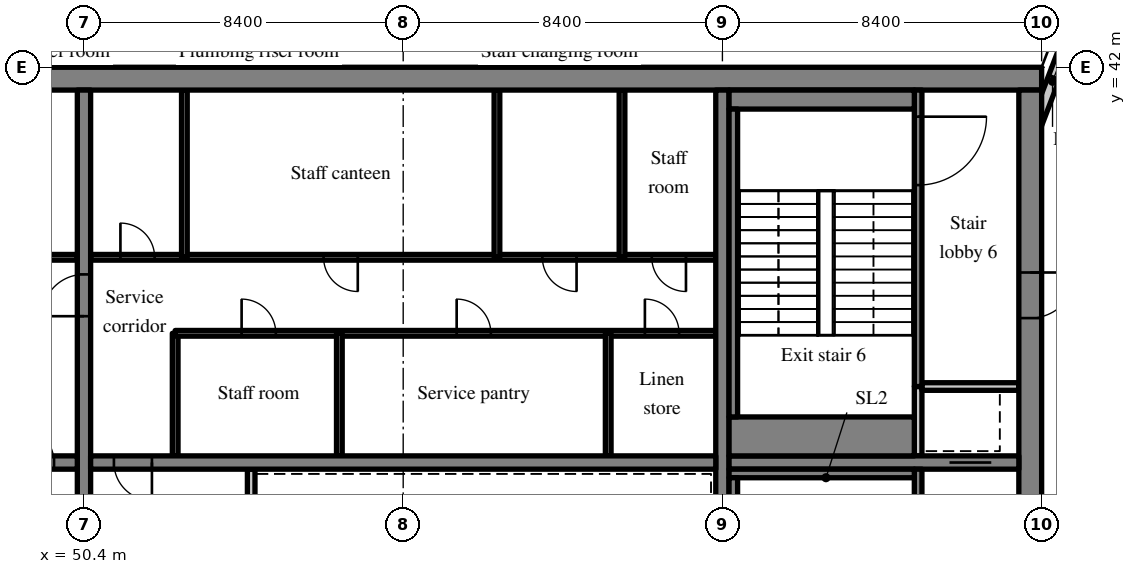
"""IFC4 building model, lengths in metres.
Left out: names, types, materials, properties, quantities, classifications, styles, units other than length and angle.
Written with IfcOpenShell. Run it as: python <this file> out.ifc"""

import sys

from ifc_helpers import new_model, si_unit, direction, frame, frame_2d, origin, place, context, subcontext, project, spatial, rectangle, extrude, source, transform, mapped, element, fill, save


model = new_model("IFC4")
c1 = context("Model", 3, precision=1e-05, world=origin(), true_north=direction((0.0, 1.0)))
c2 = subcontext(c1, "Body", "Model", "MODEL_VIEW")
j1 = project(units=[si_unit("LENGTHUNIT", "METRE"), si_unit("PLANEANGLEUNIT", "RADIAN")], contexts=[c1])
p1 = place(None, origin())
s1 = spatial("IfcSite", under=j1, at=p1, CompositionType="ELEMENT")
p2 = place(p1, origin())
s2 = spatial("IfcBuilding", under=s1, at=p2, CompositionType="ELEMENT")
p3 = place(p2, frame((0.0, 0.0, 217.9)))
s3 = spatial("IfcBuildingStorey", under=s2, at=p3, CompositionType="ELEMENT", Elevation=217.9)
m1 = source(origin(), c2, "Body", "SweptSolid", [
    extrude(rectangle(XDim=50.4, YDim=0.6, at=frame_2d((25.2, 0.0))), origin(), (0.0, 0.0, 1.0), 3.62),
])
p4 = place(p3, frame((25.2, 41.7, 0.0), z_axis=(0.0, 0.0, 1.0), x_axis=(1.0, 0.0, 0.0)))
e1 = element("IfcWall", 1, at=p4, inside=s3, PredefinedType="SHEAR", context=c2, shape_type="MappedRepresentation", body=[
    mapped(m1, transform((0.0, 0.0, 0.0), scale=1.0)),
])
m2 = source(origin(), c2, "Body", "SweptSolid", [
    extrude(rectangle(XDim=18.8, YDim=0.6, at=frame_2d((9.4, 0.0))), origin(), (0.0, 0.0, 1.0), 3.62),
])
p5 = place(p3, frame((75.3, 22.6, 0.0), z_axis=(0.0, 0.0, 1.0), x_axis=(0.0, 1.0, 0.0)))
e2 = element("IfcWall", 2, at=p5, inside=s3, PredefinedType="SHEAR", context=c2, shape_type="MappedRepresentation", body=[
    mapped(m2, transform((0.0, 0.0, 0.0), scale=1.0)),
])
m3 = source(origin(), c2, "Body", "SweptSolid", [
    extrude(rectangle(XDim=1.2, YDim=2.1, at=frame_2d((0.6, 1.05))), frame((0.0, 0.31, 0.0), z_axis=(0.0, -1.0, 0.0), x_axis=(1.0, 0.0, 0.0)), (0.0, 0.0, 1.0), 0.62),
])
p6 = place(p5, frame((12.8, 0.0, 0.0)))
e3 = element("IfcOpeningElement", 3, at=p6, cuts=e2, PredefinedType="OPENING", context=c2, shape_type="MappedRepresentation", body=[
    mapped(m3, transform((0.0, 0.0, 0.0), scale=1.0)),
])
m4 = source(origin(), c2, "Body", "SweptSolid", [
    extrude(rectangle(XDim=18.8, YDim=0.35, at=frame_2d((9.4, 0.0))), origin(), (0.0, 0.0, 1.0), 3.62),
])
p7 = place(p3, frame((50.4, 22.6, 0.0), z_axis=(0.0, 0.0, 1.0), x_axis=(0.0, 1.0, 0.0)))
e4 = element("IfcWall", 4, at=p7, inside=s3, PredefinedType="SHEAR", context=c2, shape_type="MappedRepresentation", body=[
    mapped(m4, transform((0.0, 0.0, 0.0), scale=1.0)),
])
m5 = source(origin(), c2, "Body", "SweptSolid", [
    extrude(rectangle(XDim=1.1, YDim=2.1, at=frame_2d((0.55, 1.05))), frame((0.0, 0.185, 0.0), z_axis=(0.0, -1.0, 0.0), x_axis=(1.0, 0.0, 0.0)), (0.0, 0.0, 1.0), 0.37),
])
p8 = place(p7, frame((12.85, 0.0, 0.0)))
e5 = element("IfcOpeningElement", 5, at=p8, cuts=e4, PredefinedType="OPENING", context=c2, shape_type="MappedRepresentation", body=[
    mapped(m5, transform((0.0, 0.0, 0.0), scale=1.0)),
])
p9 = place(p3, frame((67.2, 22.6, 0.0), z_axis=(0.0, 0.0, 1.0), x_axis=(0.0, 1.0, 0.0)))
e6 = element("IfcWall", 6, at=p9, inside=s3, PredefinedType="SHEAR", context=c2, shape_type="MappedRepresentation", body=[
    mapped(m4, transform((0.0, 0.0, 0.0), scale=1.0)),
])
m6 = source(origin(), c2, "Body", "SweptSolid", [
    extrude(rectangle(XDim=16.45, YDim=0.35, at=frame_2d((8.225, 0.0))), origin(), (0.0, 0.0, 1.0), 3.62),
])
p10 = place(p3, frame((33.775, 31.6, 0.0), z_axis=(0.0, 0.0, 1.0), x_axis=(1.0, 0.0, 0.0)))
e7 = element("IfcWall", 7, at=p10, inside=s3, PredefinedType="SHEAR", context=c2, shape_type="MappedRepresentation", body=[
    mapped(m6, transform((0.0, 0.0, 0.0), scale=1.0)),
])
m7 = source(origin(), c2, "Body", "SweptSolid", [
    extrude(rectangle(XDim=1.0, YDim=2.1, at=frame_2d((0.5, 1.05))), frame((0.0, 0.185, 0.0), z_axis=(0.0, -1.0, 0.0), x_axis=(1.0, 0.0, 0.0)), (0.0, 0.0, 1.0), 0.37),
])
p11 = place(p10, frame((14.837, 0.0, 0.0)))
e8 = element("IfcOpeningElement", 8, at=p11, cuts=e7, PredefinedType="OPENING", context=c2, shape_type="MappedRepresentation", body=[
    mapped(m7, transform((0.0, 0.0, 0.0), scale=1.0)),
])
m8 = source(origin(), c2, "Body", "SweptSolid", [
    extrude(rectangle(XDim=16.45, YDim=0.35, at=frame_2d((8.225, 0.0))), origin(), (0.0, 0.0, 1.0), 3.62),
])
p12 = place(p3, frame((50.575, 31.6, 0.0), z_axis=(0.0, 0.0, 1.0), x_axis=(1.0, 0.0, 0.0)))
e9 = element("IfcWall", 9, at=p12, inside=s3, PredefinedType="SHEAR", context=c2, shape_type="MappedRepresentation", body=[
    mapped(m8, transform((0.0, 0.0, 0.0), scale=1.0)),
])
p13 = place(p12, frame((0.613, 0.0, 0.0)))
e10 = element("IfcOpeningElement", 10, at=p13, cuts=e9, PredefinedType="OPENING", context=c2, shape_type="MappedRepresentation", body=[
    mapped(m7, transform((0.0, 0.0, 0.0), scale=1.0)),
])
m9 = source(origin(), c2, "Body", "SweptSolid", [
    extrude(rectangle(XDim=7.625, YDim=0.35, at=frame_2d((3.812, 0.0))), origin(), (0.0, 0.0, 1.0), 3.62),
])
p14 = place(p3, frame((67.375, 31.6, 0.0), z_axis=(0.0, 0.0, 1.0), x_axis=(1.0, 0.0, 0.0)))
e11 = element("IfcWall", 11, at=p14, inside=s3, PredefinedType="SHEAR", context=c2, shape_type="MappedRepresentation", body=[
    mapped(m9, transform((0.0, 0.0, 0.0), scale=1.0)),
])
p15 = place(p14, frame((5.8, 0.0, 0.0)))
e12 = element("IfcOpeningElement", 12, at=p15, cuts=e11, PredefinedType="OPENING", context=c2, shape_type="MappedRepresentation", body=[
    mapped(m5, transform((0.0, 0.0, 0.0), scale=1.0)),
])
m10 = source(origin(), c2, "Body", "SweptSolid", [
    extrude(rectangle(XDim=3.559, YDim=0.3, at=frame_2d((1.78, 0.0))), origin(), (0.0, 0.0, 1.0), 3.62),
])
p16 = place(p3, frame((76.523, 43.292, 0.0), z_axis=(0.0, 0.0, 1.0), x_axis=(-0.35779745313, -0.933799219604, 0.0)))
e13 = element("IfcWall", 13, at=p16, inside=s3, PredefinedType="SOLIDWALL", context=c2, shape_type="MappedRepresentation", body=[
    mapped(m10, transform((0.0, 0.0, 0.0), scale=1.0)),
])
m11 = source(origin(), c2, "Body", "SweptSolid", [
    extrude(rectangle(XDim=1.5, YDim=2.0, at=frame_2d((0.75, 1.0))), frame((0.0, 0.16, 0.0), z_axis=(0.0, -1.0, 0.0), x_axis=(1.0, 0.0, 0.0)), (0.0, 0.0, 1.0), 0.32),
])
p17 = place(p16, frame((0.156, 0.0, 0.9)))
e14 = element("IfcOpeningElement", 14, at=p17, cuts=e13, PredefinedType="OPENING", context=c2, shape_type="MappedRepresentation", body=[
    mapped(m11, transform((0.0, 0.0, 0.0), scale=1.0)),
])
m12 = source(origin(), c2, "Body", "SweptSolid", [
    extrude(rectangle(XDim=16.45, YDim=0.15, at=frame_2d((8.225, 0.0))), origin(), (0.0, 0.0, 1.0), 3.62),
])
p18 = place(p3, frame((33.775, 37.0, 0.0), z_axis=(0.0, 0.0, 1.0), x_axis=(1.0, 0.0, 0.0)))
e15 = element("IfcWall", 15, at=p18, inside=s3, PredefinedType="PARTITIONING", context=c2, shape_type="MappedRepresentation", body=[
    mapped(m12, transform((0.0, 0.0, 0.0), scale=1.0)),
])
m13 = source(origin(), c2, "Body", "SweptSolid", [
    extrude(rectangle(XDim=0.9, YDim=2.1, at=frame_2d((0.45, 1.05))), frame((0.0, 0.085, 0.0), z_axis=(0.0, -1.0, 0.0), x_axis=(1.0, 0.0, 0.0)), (0.0, 0.0, 1.0), 0.17),
])
p19 = place(p18, frame((3.251, 0.0, 0.0)))
e16 = element("IfcOpeningElement", 16, at=p19, cuts=e15, PredefinedType="OPENING", context=c2, shape_type="MappedRepresentation", body=[
    mapped(m13, transform((0.0, 0.0, 0.0), scale=1.0)),
])
p20 = place(p18, frame((8.186, 0.0, 0.0)))
e17 = element("IfcOpeningElement", 17, at=p20, cuts=e15, PredefinedType="OPENING", context=c2, shape_type="MappedRepresentation", body=[
    mapped(m13, transform((0.0, 0.0, 0.0), scale=1.0)),
])
p21 = place(p18, frame((11.476, 0.0, 0.0)))
e18 = element("IfcOpeningElement", 18, at=p21, cuts=e15, PredefinedType="OPENING", context=c2, shape_type="MappedRepresentation", body=[
    mapped(m13, transform((0.0, 0.0, 0.0), scale=1.0)),
])
p22 = place(p18, frame((14.766, 0.0, 0.0)))
e19 = element("IfcOpeningElement", 19, at=p22, cuts=e15, PredefinedType="OPENING", context=c2, shape_type="MappedRepresentation", body=[
    mapped(m13, transform((0.0, 0.0, 0.0), scale=1.0)),
])
m14 = source(origin(), c2, "Body", "SweptSolid", [
    extrude(rectangle(XDim=2.625, YDim=0.2, at=frame_2d((1.312, 0.0))), origin(), (0.0, 0.0, 1.0), 3.62),
])
p23 = place(p3, frame((54.8, 28.8, 0.0), z_axis=(0.0, 0.0, 1.0), x_axis=(0.0, 1.0, 0.0)))
e20 = element("IfcWall", 20, at=p23, inside=s3, PredefinedType="SOLIDWALL", context=c2, shape_type="MappedRepresentation", body=[
    mapped(m14, transform((0.0, 0.0, 0.0), scale=1.0)),
])
m15 = source(origin(), c2, "Body", "SweptSolid", [
    extrude(rectangle(XDim=3.225, YDim=0.15, at=frame_2d((1.613, 0.0))), origin(), (0.0, 0.0, 1.0), 3.62),
])
p24 = place(p3, frame((52.8, 31.775, 0.0), z_axis=(0.0, 0.0, 1.0), x_axis=(0.0, 1.0, 0.0)))
e21 = element("IfcWall", 21, at=p24, inside=s3, PredefinedType="PARTITIONING", context=c2, shape_type="MappedRepresentation", body=[
    mapped(m15, transform((0.0, 0.0, 0.0), scale=1.0)),
])
m16 = source(origin(), c2, "Body", "SweptSolid", [
    extrude(rectangle(XDim=14.225, YDim=0.15, at=frame_2d((7.112, 0.0))), origin(), (0.0, 0.0, 1.0), 3.62),
])
p25 = place(p3, frame((67.025, 35.0, 0.0), z_axis=(0.0, 0.0, 1.0), x_axis=(-1.0, 0.0, 0.0)))
e22 = element("IfcWall", 22, at=p25, inside=s3, PredefinedType="PARTITIONING", context=c2, shape_type="MappedRepresentation", body=[
    mapped(m16, transform((0.0, 0.0, 0.0), scale=1.0)),
])
p26 = place(p25, frame((0.965, 0.0, 0.0)))
e23 = element("IfcOpeningElement", 23, at=p26, cuts=e22, PredefinedType="OPENING", context=c2, shape_type="MappedRepresentation", body=[
    mapped(m13, transform((0.0, 0.0, 0.0), scale=1.0)),
])
p27 = place(p25, frame((5.918, 0.0, 0.0)))
e24 = element("IfcOpeningElement", 24, at=p27, cuts=e22, PredefinedType="OPENING", context=c2, shape_type="MappedRepresentation", body=[
    mapped(m13, transform((0.0, 0.0, 0.0), scale=1.0)),
])
p28 = place(p25, frame((11.577, 0.0, 0.0)))
e25 = element("IfcOpeningElement", 25, at=p28, cuts=e22, PredefinedType="OPENING", context=c2, shape_type="MappedRepresentation", body=[
    mapped(m13, transform((0.0, 0.0, 0.0), scale=1.0)),
])
m17 = source(origin(), c2, "Body", "SweptSolid", [
    extrude(rectangle(XDim=16.45, YDim=0.15, at=frame_2d((8.225, 0.0))), origin(), (0.0, 0.0, 1.0), 3.62),
])
p29 = place(p3, frame((67.025, 37.0, 0.0), z_axis=(0.0, 0.0, 1.0), x_axis=(-1.0, 0.0, 0.0)))
e26 = element("IfcWall", 26, at=p29, inside=s3, PredefinedType="PARTITIONING", context=c2, shape_type="MappedRepresentation", body=[
    mapped(m17, transform((0.0, 0.0, 0.0), scale=1.0)),
])
p30 = place(p29, frame((0.784, 0.0, 0.0)))
e27 = element("IfcOpeningElement", 27, at=p30, cuts=e26, PredefinedType="OPENING", context=c2, shape_type="MappedRepresentation", body=[
    mapped(m13, transform((0.0, 0.0, 0.0), scale=1.0)),
])
p31 = place(p29, frame((3.663, 0.0, 0.0)))
e28 = element("IfcOpeningElement", 28, at=p31, cuts=e26, PredefinedType="OPENING", context=c2, shape_type="MappedRepresentation", body=[
    mapped(m13, transform((0.0, 0.0, 0.0), scale=1.0)),
])
p32 = place(p29, frame((9.42, 0.0, 0.0)))
e29 = element("IfcOpeningElement", 29, at=p32, cuts=e26, PredefinedType="OPENING", context=c2, shape_type="MappedRepresentation", body=[
    mapped(m13, transform((0.0, 0.0, 0.0), scale=1.0)),
])
p33 = place(p29, frame((14.766, 0.0, 0.0)))
e30 = element("IfcOpeningElement", 30, at=p33, cuts=e26, PredefinedType="OPENING", context=c2, shape_type="MappedRepresentation", body=[
    mapped(m13, transform((0.0, 0.0, 0.0), scale=1.0)),
])
for number, where, z_axis, x_axis in (
    (31, (64.195, 31.775, 0.0), (0.0, 0.0, 1.0), (0.0, 1.0, 0.0)),
    (32, (57.12, 31.775, 0.0), (0.0, 0.0, 1.0), (0.0, 1.0, 0.0)),
):
    element("IfcWall", number, at=place(p3, frame(where, z_axis=z_axis, x_axis=x_axis)), inside=s3, PredefinedType="PARTITIONING", context=c2, shape_type="MappedRepresentation", body=[
        mapped(m15, transform((0.0, 0.0, 0.0), scale=1.0)),
    ])
m18 = source(origin(), c2, "Body", "SweptSolid", [
    extrude(rectangle(XDim=4.4, YDim=0.15, at=frame_2d((2.2, 0.0))), origin(), (0.0, 0.0, 1.0), 3.62),
])
for number, where, z_axis, x_axis in (
    (33, (64.558, 37.0, 0.0), (0.0, 0.0, 1.0), (0.0, 1.0, 0.0)),
    (34, (61.267, 37.0, 0.0), (0.0, 0.0, 1.0), (0.0, 1.0, 0.0)),
    (35, (53.042, 37.0, 0.0), (0.0, 0.0, 1.0), (0.0, 1.0, 0.0)),
):
    element("IfcWall", number, at=place(p3, frame(where, z_axis=z_axis, x_axis=x_axis)), inside=s3, PredefinedType="PARTITIONING", context=c2, shape_type="MappedRepresentation", body=[
        mapped(m18, transform((0.0, 0.0, 0.0), scale=1.0)),
    ])
m19 = source(origin(), c2, "Body", "SweptSolid", [
    extrude(rectangle(XDim=8.825, YDim=0.2, at=frame_2d((4.413, 0.0))), origin(), (0.0, 0.0, 1.0), 3.62),
])
p34 = place(p3, frame((72.35, 22.6, 0.0), z_axis=(0.0, 0.0, 1.0), x_axis=(0.0, 1.0, 0.0)))
e36 = element("IfcWall", 36, at=p34, inside=s3, PredefinedType="SOLIDWALL", context=c2, shape_type="MappedRepresentation", body=[
    mapped(m19, transform((0.0, 0.0, 0.0), scale=1.0)),
])
m20 = source(origin(), c2, "Body", "SweptSolid", [
    extrude(rectangle(XDim=1.2, YDim=2.1, at=frame_2d((0.6, 1.05))), frame((0.0, 0.11, 0.0), z_axis=(0.0, -1.0, 0.0), x_axis=(1.0, 0.0, 0.0)), (0.0, 0.0, 1.0), 0.22),
])
p35 = place(p34, frame((6.9, 0.0, 0.0)))
e37 = element("IfcOpeningElement", 37, at=p35, cuts=e36, PredefinedType="OPENING", context=c2, shape_type="MappedRepresentation", body=[
    mapped(m20, transform((0.0, 0.0, 0.0), scale=1.0)),
])
m21 = source(origin(), c2, "Body", "SweptSolid", [
    extrude(rectangle(XDim=1.825, YDim=0.2, at=frame_2d((0.913, 0.0))), origin(), (0.0, 0.0, 1.0), 3.62),
])
p36 = place(p3, frame((72.35, 31.775, 0.0), z_axis=(0.0, 0.0, 1.0), x_axis=(0.0, 1.0, 0.0)))
e38 = element("IfcWall", 38, at=p36, inside=s3, PredefinedType="SOLIDWALL", context=c2, shape_type="MappedRepresentation", body=[
    mapped(m21, transform((0.0, 0.0, 0.0), scale=1.0)),
])
m22 = source(origin(), c2, "Body", "SweptSolid", [
    extrude(rectangle(XDim=2.55, YDim=0.2, at=frame_2d((1.275, 0.0))), origin(), (0.0, 0.0, 1.0), 3.62),
])
p37 = place(p3, frame((72.45, 33.6, 0.0), z_axis=(0.0, 0.0, 1.0), x_axis=(1.0, 0.0, 0.0)))
e39 = element("IfcWall", 39, at=p37, inside=s3, PredefinedType="SOLIDWALL", context=c2, shape_type="MappedRepresentation", body=[
    mapped(m22, transform((0.0, 0.0, 0.0), scale=1.0)),
])
m23 = source(origin(), c2, "Body", "SweptSolid", [
    extrude(rectangle(XDim=7.8, YDim=0.2, at=frame_2d((3.9, 0.0))), origin(), (0.0, 0.0, 1.0), 3.62),
])
p38 = place(p3, frame((72.35, 33.6, 0.0), z_axis=(0.0, 0.0, 1.0), x_axis=(0.0, 1.0, 0.0)))
e40 = element("IfcWall", 40, at=p38, inside=s3, PredefinedType="SOLIDWALL", context=c2, shape_type="MappedRepresentation", body=[
    mapped(m23, transform((0.0, 0.0, 0.0), scale=1.0)),
])
m24 = source(origin(), c2, "Body", "SweptSolid", [
    extrude(rectangle(XDim=1.8, YDim=2.1, at=frame_2d((0.9, 1.05))), frame((0.0, 0.11, 0.0), z_axis=(0.0, -1.0, 0.0), x_axis=(1.0, 0.0, 0.0)), (0.0, 0.0, 1.0), 0.22),
])
p39 = place(p38, frame((5.3, 0.0, 0.0)))
e41 = element("IfcOpeningElement", 41, at=p39, cuts=e40, PredefinedType="OPENING", context=c2, shape_type="MappedRepresentation", body=[
    mapped(m24, transform((0.0, 0.0, 0.0), scale=1.0)),
])
m25 = source(origin(), c2, "Body", "SweptSolid", [
    extrude(rectangle(XDim=4.875, YDim=0.225, at=frame_2d((2.438, 0.0))), origin(), (0.0, 0.0, 1.0), 3.62),
])
p40 = place(p3, frame((67.375, 31.312, 0.0), z_axis=(0.0, 0.0, 1.0), x_axis=(1.0, 0.0, 0.0)))
e42 = element("IfcWall", 42, at=p40, inside=s3, PredefinedType="SOLIDWALL", context=c2, shape_type="MappedRepresentation", body=[
    mapped(m25, transform((0.0, 0.0, 0.0), scale=1.0)),
])
m26 = source(origin(), c2, "Body", "SweptSolid", [
    extrude(rectangle(XDim=8.1, YDim=0.225, at=frame_2d((4.05, 0.0))), origin(), (0.0, 0.0, 1.0), 3.62),
])
p41 = place(p3, frame((67.487, 23.1, 0.0), z_axis=(0.0, 0.0, 1.0), x_axis=(0.0, 1.0, 0.0)))
e43 = element("IfcWall", 43, at=p41, inside=s3, PredefinedType="SOLIDWALL", context=c2, shape_type="MappedRepresentation", body=[
    mapped(m26, transform((0.0, 0.0, 0.0), scale=1.0)),
])
m27 = source(origin(), c2, "Body", "SweptSolid", [
    extrude(rectangle(XDim=4.875, YDim=0.5, at=frame_2d((2.438, 0.0))), origin(), (0.0, 0.0, 1.0), 3.62),
])
p42 = place(p3, frame((67.375, 41.15, 0.0), z_axis=(0.0, 0.0, 1.0), x_axis=(1.0, 0.0, 0.0)))
e44 = element("IfcWall", 44, at=p42, inside=s3, PredefinedType="SOLIDWALL", context=c2, shape_type="MappedRepresentation", body=[
    mapped(m27, transform((0.0, 0.0, 0.0), scale=1.0)),
])
m28 = source(origin(), c2, "Body", "SweptSolid", [
    extrude(rectangle(XDim=4.875, YDim=1.025, at=frame_2d((2.438, 0.0))), origin(), (0.0, 0.0, 1.0), 3.62),
])
p43 = place(p3, frame((67.375, 32.287, 0.0), z_axis=(0.0, 0.0, 1.0), x_axis=(1.0, 0.0, 0.0)))
e45 = element("IfcWall", 45, at=p43, inside=s3, PredefinedType="SOLIDWALL", context=c2, shape_type="MappedRepresentation", body=[
    mapped(m28, transform((0.0, 0.0, 0.0), scale=1.0)),
])
p44 = place(p3, frame((67.487, 32.8, 0.0), z_axis=(0.0, 0.0, 1.0), x_axis=(0.0, 1.0, 0.0)))
e46 = element("IfcWall", 46, at=p44, inside=s3, PredefinedType="SOLIDWALL", context=c2, shape_type="MappedRepresentation", body=[
    mapped(m26, transform((0.0, 0.0, 0.0), scale=1.0)),
])
m29 = source(origin(), c2, "Body", "SweptSolid", [
    extrude(rectangle(XDim=1.5, YDim=2.0, at=frame_2d((0.75, 1.0))), frame((0.0, 0.03, 0.0), z_axis=(0.0, -1.0, 0.0), x_axis=(1.0, 0.0, 0.0)), (0.0, 0.0, 1.0), 0.06),
])
p45 = place(p17, origin())
e47 = element("IfcWindow", 47, at=p45, inside=s3, PartitioningType="SINGLE_PANEL", PredefinedType="WINDOW", context=c2, shape_type="MappedRepresentation", body=[
    mapped(m29, transform((0.0, 0.0, 0.0), scale=1.0)),
])
fill(e14, e47)
m30 = source(origin(), c2, "Body", "SweptSolid", [
    extrude(rectangle(XDim=1.0, YDim=2.1, at=frame_2d((0.5, 1.05))), frame((0.0, 0.025, 0.0), z_axis=(0.0, -1.0, 0.0), x_axis=(1.0, 0.0, 0.0)), (0.0, 0.0, 1.0), 0.05),
])
p46 = place(p11, origin())
e48 = element("IfcDoor", 48, at=p46, inside=s3, OperationType="SINGLE_SWING_LEFT", PredefinedType="DOOR", context=c2, shape_type="MappedRepresentation", body=[
    mapped(m30, transform((0.0, 0.0, 0.0), scale=1.0)),
])
fill(e8, e48)
p47 = place(p13, origin())
e49 = element("IfcDoor", 49, at=p47, inside=s3, OperationType="SINGLE_SWING_RIGHT", PredefinedType="DOOR", context=c2, shape_type="MappedRepresentation", body=[
    mapped(m30, transform((0.0, 0.0, 0.0), scale=1.0)),
])
fill(e10, e49)
m31 = source(origin(), c2, "Body", "SweptSolid", [
    extrude(rectangle(XDim=0.9, YDim=2.1, at=frame_2d((0.45, 1.05))), frame((0.0, 0.025, 0.0), z_axis=(0.0, -1.0, 0.0), x_axis=(1.0, 0.0, 0.0)), (0.0, 0.0, 1.0), 0.05),
])
p48 = place(p26, origin())
e50 = element("IfcDoor", 50, at=p48, inside=s3, OperationType="SINGLE_SWING_RIGHT", PredefinedType="DOOR", context=c2, shape_type="MappedRepresentation", body=[
    mapped(m31, transform((0.0, 0.0, 0.0), scale=1.0)),
])
fill(e23, e50)
p49 = place(p27, origin())
e51 = element("IfcDoor", 51, at=p49, inside=s3, OperationType="SINGLE_SWING_RIGHT", PredefinedType="DOOR", context=c2, shape_type="MappedRepresentation", body=[
    mapped(m31, transform((0.0, 0.0, 0.0), scale=1.0)),
])
fill(e24, e51)
p50 = place(p28, origin())
e52 = element("IfcDoor", 52, at=p50, inside=s3, OperationType="SINGLE_SWING_RIGHT", PredefinedType="DOOR", context=c2, shape_type="MappedRepresentation", body=[
    mapped(m31, transform((0.0, 0.0, 0.0), scale=1.0)),
])
fill(e25, e52)
p51 = place(p30, origin())
e53 = element("IfcDoor", 53, at=p51, inside=s3, OperationType="SINGLE_SWING_LEFT", PredefinedType="DOOR", context=c2, shape_type="MappedRepresentation", body=[
    mapped(m31, transform((0.0, 0.0, 0.0), scale=1.0)),
])
fill(e27, e53)
p52 = place(p31, origin())
e54 = element("IfcDoor", 54, at=p52, inside=s3, OperationType="SINGLE_SWING_LEFT", PredefinedType="DOOR", context=c2, shape_type="MappedRepresentation", body=[
    mapped(m31, transform((0.0, 0.0, 0.0), scale=1.0)),
])
fill(e28, e54)
p53 = place(p32, origin())
e55 = element("IfcDoor", 55, at=p53, inside=s3, OperationType="SINGLE_SWING_LEFT", PredefinedType="DOOR", context=c2, shape_type="MappedRepresentation", body=[
    mapped(m31, transform((0.0, 0.0, 0.0), scale=1.0)),
])
fill(e29, e55)
p54 = place(p33, origin())
e56 = element("IfcDoor", 56, at=p54, inside=s3, OperationType="SINGLE_SWING_RIGHT", PredefinedType="DOOR", context=c2, shape_type="MappedRepresentation", body=[
    mapped(m31, transform((0.0, 0.0, 0.0), scale=1.0)),
])
fill(e30, e56)
m32 = source(origin(), c2, "Body", "SweptSolid", [
    extrude(rectangle(XDim=1.1, YDim=2.1, at=frame_2d((0.55, 1.05))), frame((0.0, 0.025, 0.0), z_axis=(0.0, -1.0, 0.0), x_axis=(1.0, 0.0, 0.0)), (0.0, 0.0, 1.0), 0.05),
])
p55 = place(p15, origin())
e57 = element("IfcDoor", 57, at=p55, inside=s3, OperationType="SLIDING_TO_LEFT", PredefinedType="DOOR", context=c2, shape_type="MappedRepresentation", body=[
    mapped(m32, transform((0.0, 0.0, 0.0), scale=1.0)),
])
fill(e12, e57)
m33 = source(origin(), c2, "Body", "SweptSolid", [
    extrude(rectangle(XDim=1.8, YDim=2.1, at=frame_2d((0.9, 1.05))), frame((0.0, 0.025, 0.0), z_axis=(0.0, -1.0, 0.0), x_axis=(1.0, 0.0, 0.0)), (0.0, 0.0, 1.0), 0.05),
])
p56 = place(p39, origin())
e58 = element("IfcDoor", 58, at=p56, inside=s3, OperationType="SINGLE_SWING_RIGHT", PredefinedType="DOOR", context=c2, shape_type="MappedRepresentation", body=[
    mapped(m33, transform((0.0, 0.0, 0.0), scale=1.0)),
])
fill(e41, e58)
m34 = source(origin(), c2, "Body", "SweptSolid", [
    extrude(rectangle(XDim=1.2, YDim=2.1, at=frame_2d((0.6, 1.05))), frame((0.0, 0.025, 0.0), z_axis=(0.0, -1.0, 0.0), x_axis=(1.0, 0.0, 0.0)), (0.0, 0.0, 1.0), 0.05),
])
p57 = place(p6, origin())
e59 = element("IfcDoor", 59, at=p57, inside=s3, OperationType="SINGLE_SWING_RIGHT", PredefinedType="DOOR", context=c2, shape_type="MappedRepresentation", body=[
    mapped(m34, transform((0.0, 0.0, 0.0), scale=1.0)),
])
fill(e3, e59)
p58 = place(p8, origin())
e60 = element("IfcDoor", 60, at=p58, inside=s3, OperationType="SINGLE_SWING_LEFT", PredefinedType="DOOR", context=c2, shape_type="MappedRepresentation", body=[
    mapped(m32, transform((0.0, 0.0, 0.0), scale=1.0)),
])
fill(e5, e60)
save(model, sys.argv[1])
